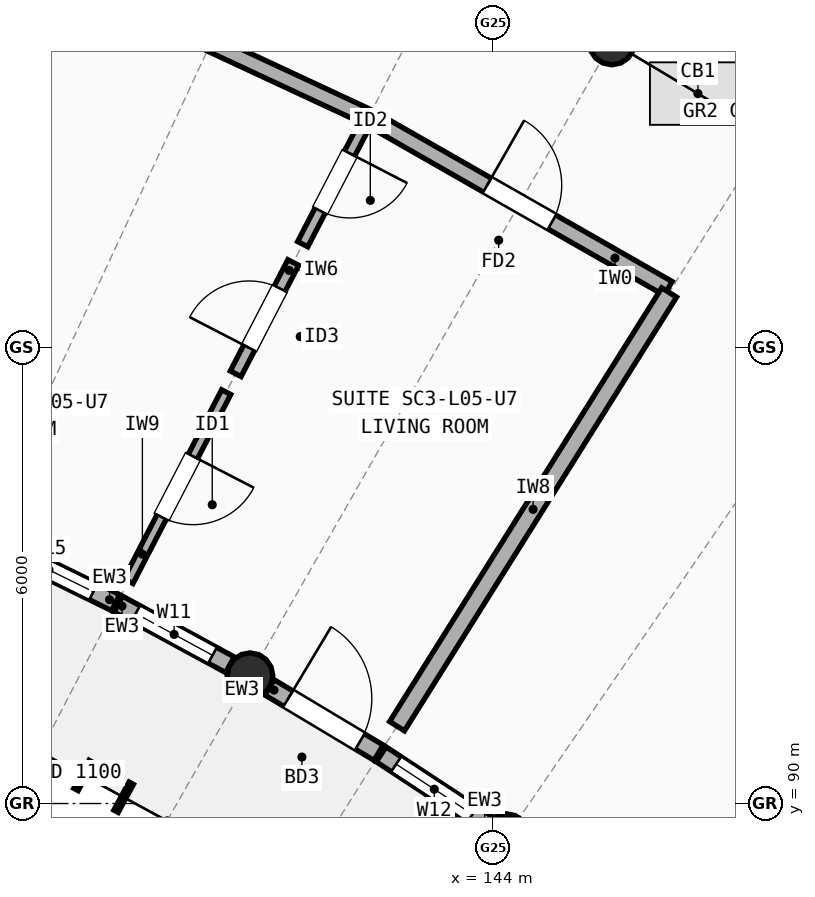
"""IFC4 building model, lengths in metres.
Left out: names, types, materials, properties, quantities, classifications, styles, units other than length and angle.
Written with IfcOpenShell. Run it as: python <this file> out.ifc"""

import sys

from ifc_helpers import new_model, si_unit, direction, frame, frame_2d, origin, origin_2d, place, context, subcontext, project, spatial, rectangle, circle, extrude, element, fill, save


model = new_model("IFC4")
c1 = context("Model", 3, precision=1e-05, world=origin(), true_north=direction((0.0, 1.0)))
c2 = subcontext(c1, "Body", "Model", "MODEL_VIEW")
j1 = project(units=[si_unit("LENGTHUNIT", "METRE"), si_unit("PLANEANGLEUNIT", "RADIAN")], contexts=[c1])
p1 = place(None, origin())
s1 = spatial("IfcSite", under=j1, at=p1, CompositionType="ELEMENT")
p2 = place(p1, origin())
s2 = spatial("IfcBuilding", under=s1, at=p2, CompositionType="ELEMENT")
p3 = place(p2, frame((0.0, 0.0, 17.3)))
s3 = spatial("IfcBuildingStorey", under=s2, at=p3, CompositionType="ELEMENT", Elevation=17.3)
for number, where, z_axis, x_axis in (
    (1, (140.804, 91.682, 0.0), (0.0, 0.0, 1.0), (1.0, 0.0, 0.0)),
    (2, (145.564, 100.018, 0.0), (0.0, 0.0, 1.0), (1.0, 0.0, 0.0)),
    (3, (144.178, 89.564, 0.0), (0.0, 0.0, 1.0), (1.0, 0.0, 0.0)),
):
    element("IfcColumn", number, at=place(p3, frame(where, z_axis=z_axis, x_axis=x_axis)), inside=s3, PredefinedType="COLUMN", context=c2, shape_type="SweptSolid", body=[
        extrude(circle(Radius=0.3, at=origin_2d()), origin(), (0.0, 0.0, 1.0), 2.94),
    ])
p4 = place(p3, frame((137.283, 93.503, 0.0), z_axis=(0.0, 0.0, 1.0), x_axis=(0.897531751182, -0.44094983345, 0.0)))
e4 = element("IfcWall", 4, at=p4, inside=s3, PredefinedType="STANDARD", context=c2, shape_type="SweptSolid", body=[
    extrude(rectangle(XDim=1.952, YDim=0.235, at=frame_2d((0.976, 0.0))), origin(), (0.0, 0.0, 1.0), 2.676),
])
p5 = place(p4, frame((0.326, 0.0, 0.85)))
e5 = element("IfcOpeningElement", 5, at=p5, cuts=e4, PredefinedType="OPENING", context=c2, shape_type="SweptSolid", body=[
    extrude(rectangle(XDim=1.3, YDim=1.45, at=frame_2d((0.65, 0.725))), frame((0.0, 0.127, 0.0), z_axis=(0.0, -1.0, 0.0), x_axis=(1.0, 0.0, 0.0)), (0.0, 0.0, 1.0), 0.255),
])
p6 = place(p3, frame((139.071, 92.624, 0.0), z_axis=(0.0, 0.0, 1.0), x_axis=(0.878447349235, -0.477839151412, 0.0)))
e6 = element("IfcWall", 6, at=p6, inside=s3, PredefinedType="STANDARD", context=c2, shape_type="SweptSolid", body=[
    extrude(rectangle(XDim=1.672, YDim=0.235, at=frame_2d((0.836, 0.0))), origin(), (0.0, 0.0, 1.0), 2.676),
])
p7 = place(p6, frame((0.261, 0.0, 0.85)))
e7 = element("IfcOpeningElement", 7, at=p7, cuts=e6, PredefinedType="OPENING", context=c2, shape_type="SweptSolid", body=[
    extrude(rectangle(XDim=1.15, YDim=1.45, at=frame_2d((0.575, 0.725))), frame((0.0, 0.127, 0.0), z_axis=(0.0, -1.0, 0.0), x_axis=(1.0, 0.0, 0.0)), (0.0, 0.0, 1.0), 0.255),
])
p8 = place(p3, frame((141.061, 91.528, 0.0), z_axis=(0.0, 0.0, 1.0), x_axis=(0.857853402967, -0.513894482377, 0.0)))
e8 = element("IfcWall", 8, at=p8, inside=s3, PredefinedType="STANDARD", context=c2, shape_type="SweptSolid", body=[
    extrude(rectangle(XDim=1.672, YDim=0.235, at=frame_2d((0.836, 0.0))), origin(), (0.0, 0.0, 1.0), 2.676),
])
p9 = place(p8, frame((0.286, 0.0, 0.0)))
e9 = element("IfcOpeningElement", 9, at=p9, cuts=e8, PredefinedType="OPENING", context=c2, shape_type="SweptSolid", body=[
    extrude(rectangle(XDim=1.1, YDim=2.15, at=frame_2d((0.55, 1.075))), frame((0.0, 0.127, 0.0), z_axis=(0.0, -1.0, 0.0), x_axis=(1.0, 0.0, 0.0)), (0.0, 0.0, 1.0), 0.255),
])
p10 = place(p3, frame((142.53, 90.647, 0.0), z_axis=(0.0, 0.0, 1.0), x_axis=(0.83589302699, -0.548892382375, 0.0)))
e10 = element("IfcWall", 10, at=p10, inside=s3, PredefinedType="STANDARD", context=c2, shape_type="SweptSolid", body=[
    extrude(rectangle(XDim=1.672, YDim=0.235, at=frame_2d((0.836, 0.0))), origin(), (0.0, 0.0, 1.0), 2.676),
])
p11 = place(p10, frame((0.236, 0.0, 0.85)))
e11 = element("IfcOpeningElement", 11, at=p11, cuts=e10, PredefinedType="OPENING", context=c2, shape_type="SweptSolid", body=[
    extrude(rectangle(XDim=1.2, YDim=1.35, at=frame_2d((0.6, 0.675))), frame((0.0, 0.127, 0.0), z_axis=(0.0, -1.0, 0.0), x_axis=(1.0, 0.0, 0.0)), (0.0, 0.0, 1.0), 0.255),
])
p12 = place(p3, frame((135.605, 94.707, 0.0), z_axis=(0.0, 0.0, 1.0), x_axis=(0.384190705314, 0.923253758157, 0.0)))
e12 = element("IfcWall", 12, at=p12, inside=s3, PredefinedType="SOLIDWALL", context=c2, shape_type="SweptSolid", body=[
    extrude(rectangle(XDim=6.736, YDim=0.23, at=frame_2d((3.368, 0.0))), origin(), (0.0, 0.0, 1.0), 2.734),
])
p13 = place(p3, frame((138.245, 100.946, 0.0), z_axis=(0.0, 0.0, 1.0), x_axis=(0.906512639591, -0.422178675755, 0.0)))
e13 = element("IfcWall", 13, at=p13, inside=s3, PredefinedType="SOLIDWALL", context=c2, shape_type="SweptSolid", body=[
    extrude(rectangle(XDim=4.501, YDim=0.21, at=frame_2d((2.251, 0.0))), origin(), (0.0, 0.0, 1.0), 2.754),
])
p14 = place(p3, frame((142.396, 99.009, 0.0), z_axis=(0.0, 0.0, 1.0), x_axis=(0.868376606973, -0.495905301909, 0.0)))
e14 = element("IfcWall", 14, at=p14, inside=s3, PredefinedType="SOLIDWALL", context=c2, shape_type="SweptSolid", body=[
    extrude(rectangle(XDim=4.502, YDim=0.21, at=frame_2d((2.251, 0.0))), origin(), (0.0, 0.0, 1.0), 2.734),
])
p15 = place(p14, frame((1.761, 0.0, 0.0)))
e15 = element("IfcOpeningElement", 15, at=p15, cuts=e14, PredefinedType="OPENING", context=c2, shape_type="SweptSolid", body=[
    extrude(rectangle(XDim=0.98, YDim=2.15, at=frame_2d((0.49, 1.075))), frame((0.0, 0.115, 0.0), z_axis=(0.0, -1.0, 0.0), x_axis=(1.0, 0.0, 0.0)), (0.0, 0.0, 1.0), 0.23),
])
p16 = place(p3, frame((139.204, 92.925, 0.0), z_axis=(0.0, 0.0, 1.0), x_axis=(0.459449012792, 0.888204145816, 0.0)))
e16 = element("IfcWall", 16, at=p16, inside=s3, PredefinedType="PARTITIONING", context=c2, shape_type="SweptSolid", body=[
    extrude(rectangle(XDim=2.8, YDim=0.135, at=frame_2d((1.4, 0.0))), origin(), (0.0, 0.0, 1.0), 2.714),
])
p17 = place(p16, frame((0.95, 0.0, 0.0)))
e17 = element("IfcOpeningElement", 17, at=p17, cuts=e16, PredefinedType="OPENING", context=c2, shape_type="SweptSolid", body=[
    extrude(rectangle(XDim=0.9, YDim=2.1, at=frame_2d((0.45, 1.05))), frame((0.0, 0.077, 0.0), z_axis=(0.0, -1.0, 0.0), x_axis=(1.0, 0.0, 0.0)), (0.0, 0.0, 1.0), 0.155),
])
p18 = place(p3, frame((140.615, 95.654, 0.0), z_axis=(0.0, 0.0, 1.0), x_axis=(0.459495453195, 0.888180121649, 0.0)))
e18 = element("IfcWall", 18, at=p18, inside=s3, PredefinedType="PLUMBINGWALL", context=c2, shape_type="SweptSolid", body=[
    extrude(rectangle(XDim=1.648, YDim=0.16, at=frame_2d((0.824, 0.0))), origin(), (0.0, 0.0, 1.0), 2.714),
])
p19 = place(p18, frame((0.384, 0.0, 0.0)))
e19 = element("IfcOpeningElement", 19, at=p19, cuts=e18, PredefinedType="OPENING", context=c2, shape_type="SweptSolid", body=[
    extrude(rectangle(XDim=0.88, YDim=2.1, at=frame_2d((0.44, 1.05))), frame((0.0, 0.09, 0.0), z_axis=(0.0, -1.0, 0.0), x_axis=(1.0, 0.0, 0.0)), (0.0, 0.0, 1.0), 0.18),
])
p20 = place(p3, frame((141.498, 97.359, 0.0), z_axis=(0.0, 0.0, 1.0), x_axis=(0.459379600499, 0.888240047873, 0.0)))
e20 = element("IfcWall", 20, at=p20, inside=s3, PredefinedType="PARTITIONING", context=c2, shape_type="SweptSolid", body=[
    extrude(rectangle(XDim=1.84, YDim=0.15, at=frame_2d((0.92, 0.0))), origin(), (0.0, 0.0, 1.0), 2.714),
])
p21 = place(p20, frame((0.495, 0.0, 0.0)))
e21 = element("IfcOpeningElement", 21, at=p21, cuts=e20, PredefinedType="OPENING", context=c2, shape_type="SweptSolid", body=[
    extrude(rectangle(XDim=0.85, YDim=2.1, at=frame_2d((0.425, 1.05))), frame((0.0, 0.085, 0.0), z_axis=(0.0, -1.0, 0.0), x_axis=(1.0, 0.0, 0.0)), (0.0, 0.0, 1.0), 0.17),
])
p22 = place(p3, frame((142.738, 91.017, 0.0), z_axis=(0.0, 0.0, 1.0), x_axis=(0.531512997039, 0.847050136638, 0.0)))
e22 = element("IfcWall", 22, at=p22, inside=s3, PredefinedType="SOLIDWALL", context=c2, shape_type="SweptSolid", body=[
    extrude(rectangle(XDim=6.736, YDim=0.23, at=frame_2d((3.368, 0.0))), origin(), (0.0, 0.0, 1.0), 2.754),
])
p23 = place(p5, origin())
e23 = element("IfcWindow", 23, at=p23, inside=s3, PartitioningType="SINGLE_PANEL", PredefinedType="WINDOW", context=c2, shape_type="SweptSolid", body=[
    extrude(rectangle(XDim=1.3, YDim=1.45, at=frame_2d((0.65, 0.725))), frame((0.0, 0.03, 0.0), z_axis=(0.0, -1.0, 0.0), x_axis=(1.0, 0.0, 0.0)), (0.0, 0.0, 1.0), 0.06),
])
fill(e5, e23)
p24 = place(p7, origin())
e24 = element("IfcWindow", 24, at=p24, inside=s3, PartitioningType="SINGLE_PANEL", PredefinedType="WINDOW", context=c2, shape_type="SweptSolid", body=[
    extrude(rectangle(XDim=1.15, YDim=1.45, at=frame_2d((0.575, 0.725))), frame((0.0, 0.03, 0.0), z_axis=(0.0, -1.0, 0.0), x_axis=(1.0, 0.0, 0.0)), (0.0, 0.0, 1.0), 0.06),
])
fill(e7, e24)
p25 = place(p9, frame((1.1, 0.0, 0.0), z_axis=(0.0, 0.0, 1.0), x_axis=(-1.0, 0.0, 0.0)))
e25 = element("IfcDoor", 25, at=p25, inside=s3, OperationType="SINGLE_SWING_LEFT", PredefinedType="DOOR", context=c2, shape_type="SweptSolid", body=[
    extrude(rectangle(XDim=1.1, YDim=2.15, at=frame_2d((0.55, 1.075))), frame((0.0, 0.025, 0.0), z_axis=(0.0, -1.0, 0.0), x_axis=(1.0, 0.0, 0.0)), (0.0, 0.0, 1.0), 0.05),
])
fill(e9, e25)
p26 = place(p11, origin())
e26 = element("IfcWindow", 26, at=p26, inside=s3, PartitioningType="SINGLE_PANEL", PredefinedType="WINDOW", context=c2, shape_type="SweptSolid", body=[
    extrude(rectangle(XDim=1.2, YDim=1.35, at=frame_2d((0.6, 0.675))), frame((0.0, 0.03, 0.0), z_axis=(0.0, -1.0, 0.0), x_axis=(1.0, 0.0, 0.0)), (0.0, 0.0, 1.0), 0.06),
])
fill(e11, e26)
p27 = place(p15, origin())
e27 = element("IfcDoor", 27, at=p27, inside=s3, OperationType="SINGLE_SWING_LEFT", PredefinedType="DOOR", context=c2, shape_type="SweptSolid", body=[
    extrude(rectangle(XDim=0.98, YDim=2.15, at=frame_2d((0.49, 1.075))), frame((0.0, 0.025, 0.0), z_axis=(0.0, -1.0, 0.0), x_axis=(1.0, 0.0, 0.0)), (0.0, 0.0, 1.0), 0.05),
])
fill(e15, e27)
p28 = place(p17, origin())
e28 = element("IfcDoor", 28, at=p28, inside=s3, OperationType="SINGLE_SWING_RIGHT", PredefinedType="DOOR", context=c2, shape_type="SweptSolid", body=[
    extrude(rectangle(XDim=0.9, YDim=2.1, at=frame_2d((0.45, 1.05))), frame((0.0, 0.025, 0.0), z_axis=(0.0, -1.0, 0.0), x_axis=(1.0, 0.0, 0.0)), (0.0, 0.0, 1.0), 0.05),
])
fill(e17, e28)
p29 = place(p19, origin())
e29 = element("IfcDoor", 29, at=p29, inside=s3, OperationType="SINGLE_SWING_LEFT", PredefinedType="DOOR", context=c2, shape_type="SweptSolid", body=[
    extrude(rectangle(XDim=0.88, YDim=2.1, at=frame_2d((0.44, 1.05))), frame((0.0, 0.025, 0.0), z_axis=(0.0, -1.0, 0.0), x_axis=(1.0, 0.0, 0.0)), (0.0, 0.0, 1.0), 0.05),
])
fill(e19, e29)
p30 = place(p21, origin())
e30 = element("IfcDoor", 30, at=p30, inside=s3, OperationType="SINGLE_SWING_RIGHT", PredefinedType="DOOR", context=c2, shape_type="SweptSolid", body=[
    extrude(rectangle(XDim=0.85, YDim=2.1, at=frame_2d((0.425, 1.05))), frame((0.0, 0.025, 0.0), z_axis=(0.0, -1.0, 0.0), x_axis=(1.0, 0.0, 0.0)), (0.0, 0.0, 1.0), 0.05),
])
fill(e21, e30)
save(model, sys.argv[1])
